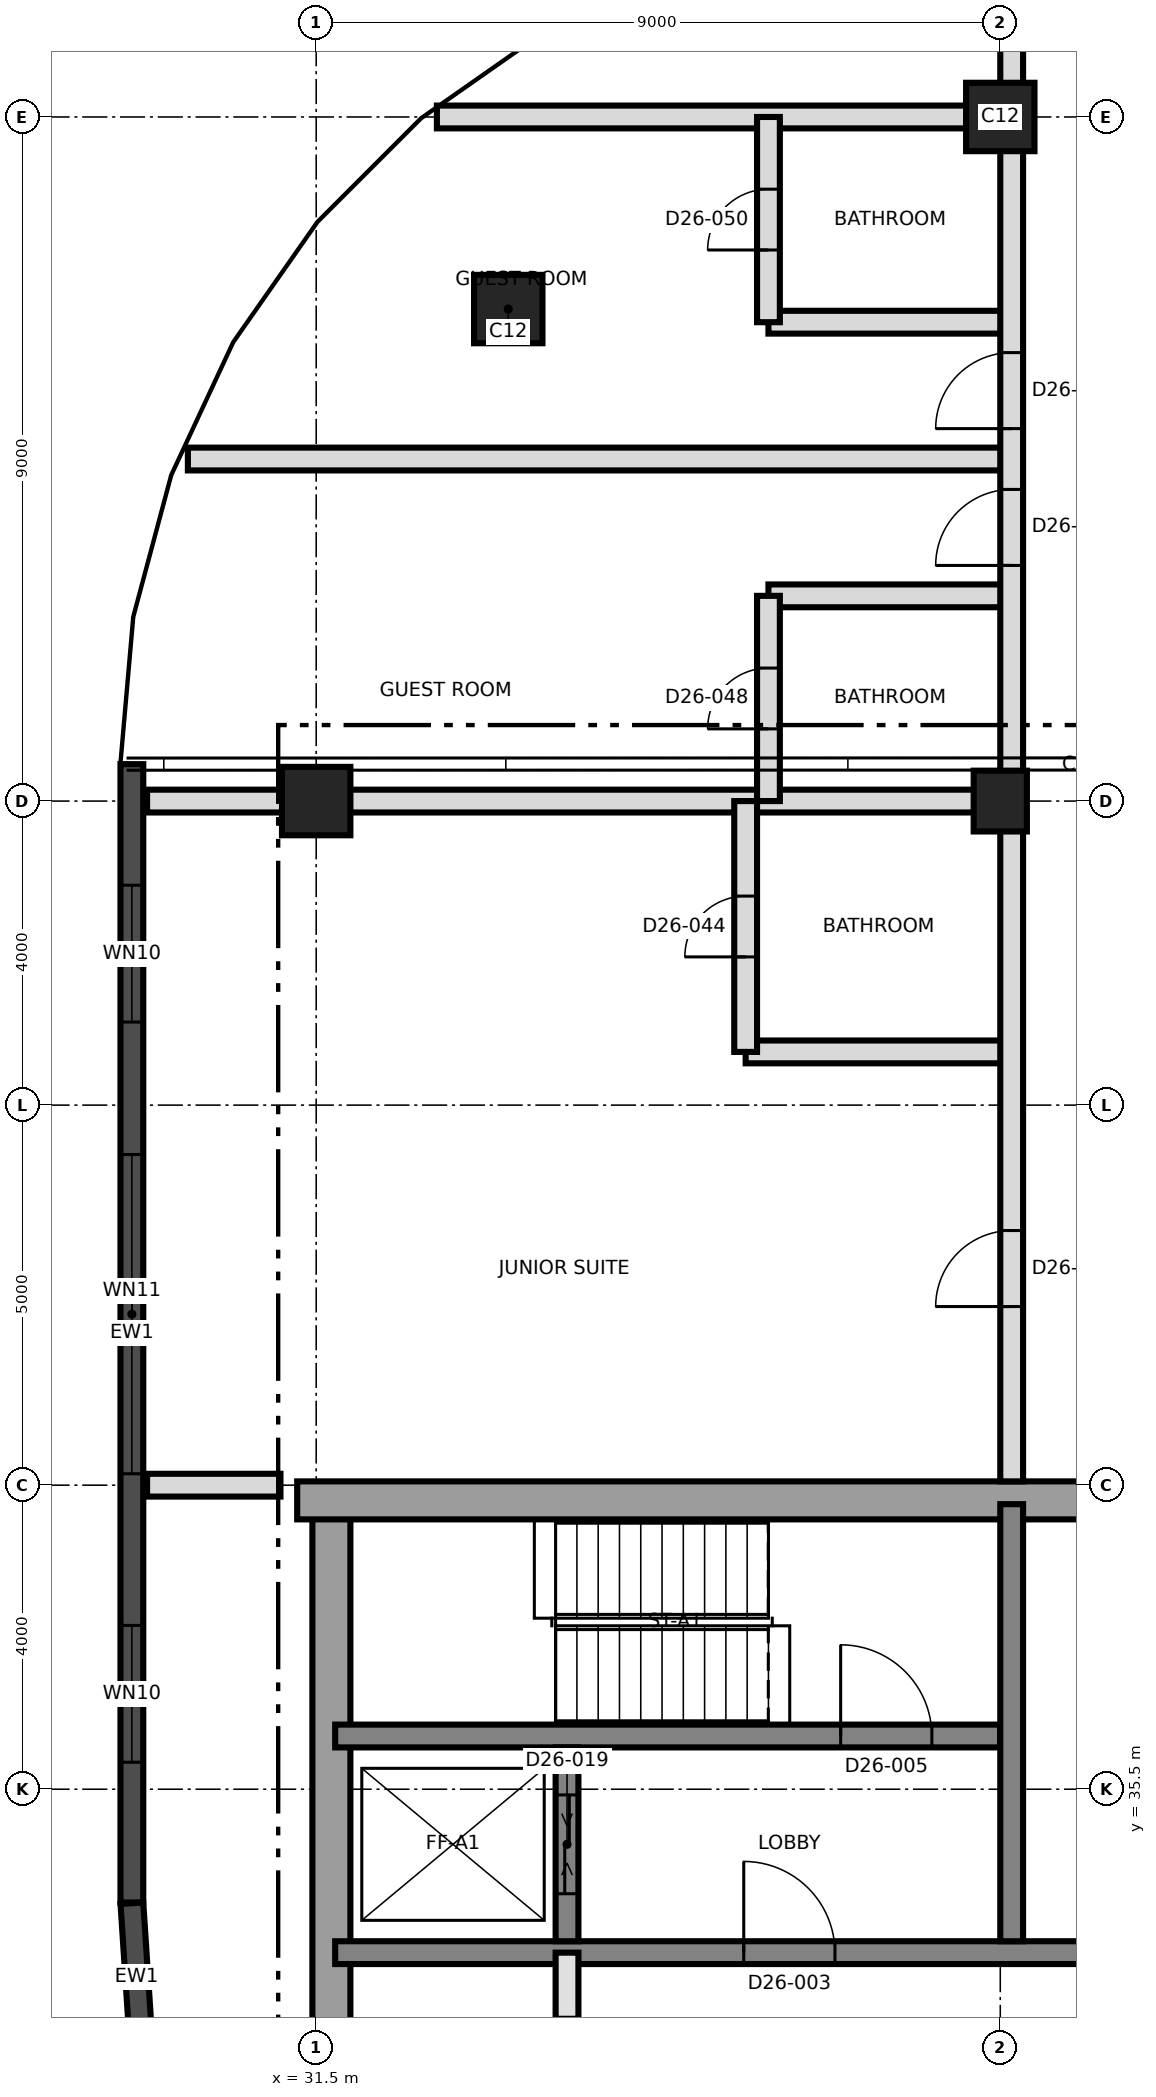
"""IFC4 building model, lengths in metres.
Left out: names, types, materials, properties, quantities, classifications, styles, units other than length and angle.
Written with IfcOpenShell. Run it as: python <this file> out.ifc"""

import sys

from ifc_helpers import new_model, si_unit, direction, frame, frame_2d, origin, origin_2d, place, context, subcontext, project, spatial, rectangle, extrude, element, fill, save


model = new_model("IFC4")
c1 = context("Model", 3, precision=1e-05, world=origin(), true_north=direction((0.0, 1.0)))
c2 = subcontext(c1, "Body", "Model", "MODEL_VIEW")
j1 = project(units=[si_unit("LENGTHUNIT", "METRE"), si_unit("PLANEANGLEUNIT", "RADIAN")], contexts=[c1])
p1 = place(None, origin())
s1 = spatial("IfcSite", under=j1, at=p1, CompositionType="ELEMENT")
p2 = place(p1, origin())
s2 = spatial("IfcBuilding", under=s1, at=p2, CompositionType="ELEMENT")
p3 = place(p2, frame((0.0, 0.0, 236.5)))
s3 = spatial("IfcBuildingStorey", under=s2, at=p3, CompositionType="ELEMENT", Elevation=236.5)
p4 = place(p3, frame((31.7, 21.75, 0.0), z_axis=(0.0, 0.0, 1.0), x_axis=(0.0, 1.0, 0.0)))
e1 = element("IfcWall", 1, at=p4, inside=s3, PredefinedType="SHEAR", context=c2, shape_type="SweptSolid", body=[
    extrude(rectangle(XDim=17.5, YDim=0.5, at=frame_2d((8.75, 0.0))), origin(), (0.0, 0.0, 1.0), 3.7),
])
p5 = place(p3, frame((31.25, 39.3, 0.0), z_axis=(0.0, 0.0, 1.0), x_axis=(1.0, 0.0, 0.0)))
e2 = element("IfcWall", 2, at=p5, inside=s3, PredefinedType="SHEAR", context=c2, shape_type="SweptSolid", body=[
    extrude(rectangle(XDim=27.0, YDim=0.5, at=frame_2d((13.5, 0.0))), origin(), (0.0, 0.0, 1.0), 3.7),
])
p6 = place(p5, frame((10.45, 0.0, 0.0)))
e3 = element("IfcOpeningElement", 3, at=p6, cuts=e2, PredefinedType="OPENING", context=c2, shape_type="SweptSolid", body=[
    extrude(rectangle(XDim=1.2, YDim=2.1, at=frame_2d((0.6, 1.05))), frame((0.0, 0.26, 0.0), z_axis=(0.0, -1.0, 0.0), x_axis=(1.0, 0.0, 0.0)), (0.0, 0.0, 1.0), 0.52),
])
p7 = place(p3, frame((31.75, 33.35, 0.0), z_axis=(0.0, 0.0, 1.0), x_axis=(1.0, 0.0, 0.0)))
e4 = element("IfcWall", 4, at=p7, inside=s3, PredefinedType="SHEAR", context=c2, shape_type="SweptSolid", body=[
    extrude(rectangle(XDim=26.5, YDim=0.3, at=frame_2d((13.25, 0.0))), origin(), (0.0, 0.0, 1.0), 3.7),
])
p8 = place(p7, frame((13.9, 0.0, 0.0)))
e5 = element("IfcOpeningElement", 5, at=p8, cuts=e4, PredefinedType="OPENING", context=c2, shape_type="SweptSolid", body=[
    extrude(rectangle(XDim=1.4, YDim=2.1, at=frame_2d((0.7, 1.05))), frame((0.0, 0.16, 0.0), z_axis=(0.0, -1.0, 0.0), x_axis=(1.0, 0.0, 0.0)), (0.0, 0.0, 1.0), 0.32),
])
p9 = place(p7, frame((5.375, 0.0, 0.0)))
e6 = element("IfcOpeningElement", 6, at=p9, cuts=e4, PredefinedType="OPENING", context=c2, shape_type="SweptSolid", body=[
    extrude(rectangle(XDim=1.2, YDim=2.1, at=frame_2d((0.6, 1.05))), frame((0.0, 0.16, 0.0), z_axis=(0.0, -1.0, 0.0), x_axis=(1.0, 0.0, 0.0)), (0.0, 0.0, 1.0), 0.32),
])
p10 = place(p7, frame((19.925, 0.0, 0.0)))
e7 = element("IfcOpeningElement", 7, at=p10, cuts=e4, PredefinedType="OPENING", context=c2, shape_type="SweptSolid", body=[
    extrude(rectangle(XDim=1.2, YDim=2.1, at=frame_2d((0.6, 1.05))), frame((0.0, 0.16, 0.0), z_axis=(0.0, -1.0, 0.0), x_axis=(1.0, 0.0, 0.0)), (0.0, 0.0, 1.0), 0.32),
])
p11 = place(p3, frame((31.75, 36.2, 0.0), z_axis=(0.0, 0.0, 1.0), x_axis=(1.0, 0.0, 0.0)))
e8 = element("IfcWall", 8, at=p11, inside=s3, PredefinedType="SHEAR", context=c2, shape_type="SweptSolid", body=[
    extrude(rectangle(XDim=8.75, YDim=0.3, at=frame_2d((4.375, 0.0))), origin(), (0.0, 0.0, 1.0), 3.7),
])
p12 = place(p11, frame((6.65, 0.0, 0.0)))
e9 = element("IfcOpeningElement", 9, at=p12, cuts=e8, PredefinedType="OPENING", context=c2, shape_type="SweptSolid", body=[
    extrude(rectangle(XDim=1.2, YDim=2.1, at=frame_2d((0.6, 1.05))), frame((0.0, 0.16, 0.0), z_axis=(0.0, -1.0, 0.0), x_axis=(1.0, 0.0, 0.0)), (0.0, 0.0, 1.0), 0.32),
])
p13 = place(p3, frame((40.65, 33.5, 0.0), z_axis=(0.0, 0.0, 1.0), x_axis=(0.0, 1.0, 0.0)))
e10 = element("IfcWall", 10, at=p13, inside=s3, PredefinedType="SHEAR", context=c2, shape_type="SweptSolid", body=[
    extrude(rectangle(XDim=5.75, YDim=0.3, at=frame_2d((2.875, 0.0))), origin(), (0.0, 0.0, 1.0), 3.7),
])
p14 = place(p3, frame((34.8, 33.5, 0.0), z_axis=(0.0, 0.0, 1.0), x_axis=(0.0, 1.0, 0.0)))
e11 = element("IfcWall", 11, at=p14, inside=s3, PredefinedType="SHEAR", context=c2, shape_type="SweptSolid", body=[
    extrude(rectangle(XDim=2.55, YDim=0.3, at=frame_2d((1.275, 0.0))), origin(), (0.0, 0.0, 1.0), 3.7),
])
p15 = place(p14, frame((0.625, 0.0, 0.0)))
e12 = element("IfcOpeningElement", 12, at=p15, cuts=e11, PredefinedType="OPENING", context=c2, shape_type="SweptSolid", body=[
    extrude(rectangle(XDim=1.3, YDim=2.4, at=frame_2d((0.65, 1.2))), frame((0.0, 0.16, 0.0), z_axis=(0.0, -1.0, 0.0), x_axis=(1.0, 0.0, 0.0)), (0.0, 0.0, 1.0), 0.32),
])
p16 = place(p3, frame((31.5, 48.5, 0.0), z_axis=(0.0, 0.0, 1.0), x_axis=(1.0, 0.0, 0.0)))
e13 = element("IfcColumn", 13, at=p16, inside=s3, PredefinedType="COLUMN", context=c2, shape_type="SweptSolid", body=[
    extrude(rectangle(XDim=0.9, YDim=0.9, at=origin_2d()), origin(), (0.0, 0.0, 1.0), 3.7),
])
p17 = place(p3, frame((40.5, 48.5, 0.0), z_axis=(0.0, 0.0, 1.0), x_axis=(0.0, 1.0, 0.0)))
e14 = element("IfcColumn", 14, at=p17, inside=s3, PredefinedType="COLUMN", context=c2, shape_type="SweptSolid", body=[
    extrude(rectangle(XDim=0.8, YDim=0.7, at=origin_2d()), origin(), (0.0, 0.0, 1.0), 3.7),
])
for number, where, z_axis, x_axis in (
    (15, (34.027, 54.973, 0.0), (0.0, 0.0, 1.0), (1.0, 0.0, 0.0)),
    (16, (40.5, 57.5, 0.0), (0.0, 0.0, 1.0), (1.0, 0.0, 0.0)),
):
    element("IfcColumn", number, at=place(p3, frame(where, z_axis=z_axis, x_axis=x_axis)), inside=s3, PredefinedType="COLUMN", context=c2, shape_type="SweptSolid", body=[
        extrude(rectangle(XDim=0.9, YDim=0.9, at=origin_2d()), origin(), (0.0, 0.0, 1.0), 3.7),
    ])
p18 = place(p3, frame((29.075, 48.986, 0.0), z_axis=(0.0, 0.0, 1.0), x_axis=(0.0, -1.0, 0.0)))
e17 = element("IfcWall", 17, at=p18, inside=s3, PredefinedType="SOLIDWALL", context=c2, shape_type="SweptSolid", body=[
    extrude(rectangle(XDim=14.976, YDim=0.3, at=frame_2d((7.488, 0.0))), origin(), (0.0, 0.0, 1.0), 3.4),
])
p19 = place(p18, frame((1.593, 0.0, 0.3)))
e18 = element("IfcOpeningElement", 18, at=p19, cuts=e17, PredefinedType="OPENING", context=c2, shape_type="SweptSolid", body=[
    extrude(rectangle(XDim=1.8, YDim=2.4, at=frame_2d((0.9, 1.2))), frame((0.0, 0.16, 0.0), z_axis=(0.0, -1.0, 0.0), x_axis=(1.0, 0.0, 0.0)), (0.0, 0.0, 1.0), 0.32),
])
p20 = place(p18, frame((5.136, 0.0, 0.9)))
e19 = element("IfcOpeningElement", 19, at=p20, cuts=e17, PredefinedType="OPENING", context=c2, shape_type="SweptSolid", body=[
    extrude(rectangle(XDim=4.2, YDim=1.5, at=frame_2d((2.1, 0.75))), frame((0.0, 0.16, 0.0), z_axis=(0.0, -1.0, 0.0), x_axis=(1.0, 0.0, 0.0)), (0.0, 0.0, 1.0), 0.32),
])
p21 = place(p18, frame((11.331, 0.0, 0.3)))
e20 = element("IfcOpeningElement", 20, at=p21, cuts=e17, PredefinedType="OPENING", context=c2, shape_type="SweptSolid", body=[
    extrude(rectangle(XDim=1.8, YDim=2.4, at=frame_2d((0.9, 1.2))), frame((0.0, 0.16, 0.0), z_axis=(0.0, -1.0, 0.0), x_axis=(1.0, 0.0, 0.0)), (0.0, 0.0, 1.0), 0.32),
])
p22 = place(p3, frame((29.075, 34.0, 0.0), z_axis=(0.0, 0.0, 1.0), x_axis=(0.065359381612, -0.997861789646, 0.0)))
e21 = element("IfcWall", 21, at=p22, inside=s3, PredefinedType="SOLIDWALL", context=c2, shape_type="SweptSolid", body=[
    extrude(rectangle(XDim=1.942, YDim=0.3, at=frame_2d((0.971, 0.0))), origin(), (0.0, 0.0, 1.0), 3.4),
])
p23 = place(p3, frame((34.8, 30.65, 0.0), z_axis=(0.0, 0.0, 1.0), x_axis=(0.0, 1.0, 0.0)))
e22 = element("IfcWall", 22, at=p23, inside=s3, PredefinedType="SOLIDWALL", context=c2, shape_type="SweptSolid", body=[
    extrude(rectangle(XDim=2.7, YDim=0.3, at=frame_2d((1.35, 0.0))), origin(), (0.0, 0.0, 1.0), 3.4),
])
p24 = place(p23, frame((0.85, 0.0, 0.0)))
e23 = element("IfcOpeningElement", 23, at=p24, cuts=e22, PredefinedType="OPENING", context=c2, shape_type="SweptSolid", body=[
    extrude(rectangle(XDim=1.0, YDim=2.1, at=frame_2d((0.5, 1.05))), frame((0.0, 0.16, 0.0), z_axis=(0.0, -1.0, 0.0), x_axis=(1.0, 0.0, 0.0)), (0.0, 0.0, 1.0), 0.32),
])
p25 = place(p3, frame((29.275, 39.5, 0.0), z_axis=(0.0, 0.0, 1.0), x_axis=(1.0, 0.0, 0.0)))
e24 = element("IfcWall", 24, at=p25, inside=s3, PredefinedType="PARTITIONING", context=c2, shape_type="SweptSolid", body=[
    extrude(rectangle(XDim=1.755, YDim=0.3, at=frame_2d((0.877, 0.0))), origin(), (0.0, 0.0, 1.0), 3.4),
])
p26 = place(p3, frame((37.15, 45.2, 0.0), z_axis=(0.0, 0.0, 1.0), x_axis=(1.0, 0.0, 0.0)))
e25 = element("IfcWall", 25, at=p26, inside=s3, PredefinedType="PARTITIONING", context=c2, shape_type="SweptSolid", body=[
    extrude(rectangle(XDim=3.5, YDim=0.3, at=frame_2d((1.75, 0.0))), origin(), (0.0, 0.0, 1.0), 3.4),
])
p27 = place(p3, frame((29.275, 48.5, 0.0), z_axis=(0.0, 0.0, 1.0), x_axis=(1.0, 0.0, 0.0)))
e26 = element("IfcWall", 26, at=p27, inside=s3, PredefinedType="PARTITIONING", context=c2, shape_type="SweptSolid", body=[
    extrude(rectangle(XDim=11.375, YDim=0.3, at=frame_2d((5.688, 0.0))), origin(), (0.0, 0.0, 1.0), 3.4),
])
p28 = place(p3, frame((37.45, 51.2, 0.0), z_axis=(0.0, 0.0, 1.0), x_axis=(1.0, 0.0, 0.0)))
e27 = element("IfcWall", 27, at=p28, inside=s3, PredefinedType="PARTITIONING", context=c2, shape_type="SweptSolid", body=[
    extrude(rectangle(XDim=3.2, YDim=0.3, at=frame_2d((1.6, 0.0))), origin(), (0.0, 0.0, 1.0), 3.4),
])
p29 = place(p3, frame((29.812, 53.0, 0.0), z_axis=(0.0, 0.0, 1.0), x_axis=(1.0, 0.0, 0.0)))
e28 = element("IfcWall", 28, at=p29, inside=s3, PredefinedType="PARTITIONING", context=c2, shape_type="SweptSolid", body=[
    extrude(rectangle(XDim=10.838, YDim=0.3, at=frame_2d((5.419, 0.0))), origin(), (0.0, 0.0, 1.0), 3.4),
])
p30 = place(p3, frame((37.45, 54.8, 0.0), z_axis=(0.0, 0.0, 1.0), x_axis=(1.0, 0.0, 0.0)))
e29 = element("IfcWall", 29, at=p30, inside=s3, PredefinedType="PARTITIONING", context=c2, shape_type="SweptSolid", body=[
    extrude(rectangle(XDim=3.2, YDim=0.3, at=frame_2d((1.6, 0.0))), origin(), (0.0, 0.0, 1.0), 3.4),
])
p31 = place(p3, frame((33.088, 57.5, 0.0), z_axis=(0.0, 0.0, 1.0), x_axis=(1.0, 0.0, 0.0)))
e30 = element("IfcWall", 30, at=p31, inside=s3, PredefinedType="PARTITIONING", context=c2, shape_type="SweptSolid", body=[
    extrude(rectangle(XDim=7.562, YDim=0.3, at=frame_2d((3.781, 0.0))), origin(), (0.0, 0.0, 1.0), 3.4),
])
p32 = place(p3, frame((37.15, 45.2, 0.0), z_axis=(0.0, 0.0, 1.0), x_axis=(0.0, 1.0, 0.0)))
e31 = element("IfcWall", 31, at=p32, inside=s3, PredefinedType="PARTITIONING", context=c2, shape_type="SweptSolid", body=[
    extrude(rectangle(XDim=3.3, YDim=0.3, at=frame_2d((1.65, 0.0))), origin(), (0.0, 0.0, 1.0), 3.4),
])
p33 = place(p32, frame((1.25, 0.0, 0.0)))
e32 = element("IfcOpeningElement", 32, at=p33, cuts=e31, PredefinedType="OPENING", context=c2, shape_type="SweptSolid", body=[
    extrude(rectangle(XDim=0.8, YDim=2.1, at=frame_2d((0.4, 1.05))), frame((0.0, 0.16, 0.0), z_axis=(0.0, -1.0, 0.0), x_axis=(1.0, 0.0, 0.0)), (0.0, 0.0, 1.0), 0.32),
])
p34 = place(p3, frame((37.45, 48.5, 0.0), z_axis=(0.0, 0.0, 1.0), x_axis=(0.0, 1.0, 0.0)))
e33 = element("IfcWall", 33, at=p34, inside=s3, PredefinedType="PARTITIONING", context=c2, shape_type="SweptSolid", body=[
    extrude(rectangle(XDim=2.7, YDim=0.3, at=frame_2d((1.35, 0.0))), origin(), (0.0, 0.0, 1.0), 3.4),
])
p35 = place(p34, frame((0.95, 0.0, 0.0)))
e34 = element("IfcOpeningElement", 34, at=p35, cuts=e33, PredefinedType="OPENING", context=c2, shape_type="SweptSolid", body=[
    extrude(rectangle(XDim=0.8, YDim=2.1, at=frame_2d((0.4, 1.05))), frame((0.0, 0.16, 0.0), z_axis=(0.0, -1.0, 0.0), x_axis=(1.0, 0.0, 0.0)), (0.0, 0.0, 1.0), 0.32),
])
p36 = place(p3, frame((37.45, 54.8, 0.0), z_axis=(0.0, 0.0, 1.0), x_axis=(0.0, 1.0, 0.0)))
e35 = element("IfcWall", 35, at=p36, inside=s3, PredefinedType="PARTITIONING", context=c2, shape_type="SweptSolid", body=[
    extrude(rectangle(XDim=2.7, YDim=0.3, at=frame_2d((1.35, 0.0))), origin(), (0.0, 0.0, 1.0), 3.4),
])
p37 = place(p36, frame((0.95, 0.0, 0.0)))
e36 = element("IfcOpeningElement", 36, at=p37, cuts=e35, PredefinedType="OPENING", context=c2, shape_type="SweptSolid", body=[
    extrude(rectangle(XDim=0.8, YDim=2.1, at=frame_2d((0.4, 1.05))), frame((0.0, 0.16, 0.0), z_axis=(0.0, -1.0, 0.0), x_axis=(1.0, 0.0, 0.0)), (0.0, 0.0, 1.0), 0.32),
])
p38 = place(p3, frame((40.65, 39.55, 0.0), z_axis=(0.0, 0.0, 1.0), x_axis=(0.0, 1.0, 0.0)))
e37 = element("IfcWall", 37, at=p38, inside=s3, PredefinedType="PARTITIONING", context=c2, shape_type="SweptSolid", body=[
    extrude(rectangle(XDim=19.0, YDim=0.3, at=frame_2d((9.5, 0.0))), origin(), (0.0, 0.0, 1.0), 3.4),
])
p39 = place(p38, frame((2.3, 0.0, 0.0)))
e38 = element("IfcOpeningElement", 38, at=p39, cuts=e37, PredefinedType="OPENING", context=c2, shape_type="SweptSolid", body=[
    extrude(rectangle(XDim=1.0, YDim=2.4, at=frame_2d((0.5, 1.2))), frame((0.0, 0.16, 0.0), z_axis=(0.0, -1.0, 0.0), x_axis=(1.0, 0.0, 0.0)), (0.0, 0.0, 1.0), 0.32),
])
p40 = place(p38, frame((12.05, 0.0, 0.0)))
e39 = element("IfcOpeningElement", 39, at=p40, cuts=e37, PredefinedType="OPENING", context=c2, shape_type="SweptSolid", body=[
    extrude(rectangle(XDim=1.0, YDim=2.1, at=frame_2d((0.5, 1.05))), frame((0.0, 0.16, 0.0), z_axis=(0.0, -1.0, 0.0), x_axis=(1.0, 0.0, 0.0)), (0.0, 0.0, 1.0), 0.32),
])
p41 = place(p38, frame((13.85, 0.0, 0.0)))
e40 = element("IfcOpeningElement", 40, at=p41, cuts=e37, PredefinedType="OPENING", context=c2, shape_type="SweptSolid", body=[
    extrude(rectangle(XDim=1.0, YDim=2.1, at=frame_2d((0.5, 1.05))), frame((0.0, 0.16, 0.0), z_axis=(0.0, -1.0, 0.0), x_axis=(1.0, 0.0, 0.0)), (0.0, 0.0, 1.0), 0.32),
])
p42 = place(p19, origin())
e41 = element("IfcWindow", 41, at=p42, inside=s3, PartitioningType="SINGLE_PANEL", PredefinedType="WINDOW", context=c2, shape_type="SweptSolid", body=[
    extrude(rectangle(XDim=1.8, YDim=2.4, at=frame_2d((0.9, 1.2))), frame((0.0, 0.03, 0.0), z_axis=(0.0, -1.0, 0.0), x_axis=(1.0, 0.0, 0.0)), (0.0, 0.0, 1.0), 0.06),
])
fill(e18, e41)
p43 = place(p20, origin())
e42 = element("IfcWindow", 42, at=p43, inside=s3, PartitioningType="SINGLE_PANEL", PredefinedType="WINDOW", context=c2, shape_type="SweptSolid", body=[
    extrude(rectangle(XDim=4.2, YDim=1.5, at=frame_2d((2.1, 0.75))), frame((0.0, 0.03, 0.0), z_axis=(0.0, -1.0, 0.0), x_axis=(1.0, 0.0, 0.0)), (0.0, 0.0, 1.0), 0.06),
])
fill(e19, e42)
p44 = place(p21, origin())
e43 = element("IfcWindow", 43, at=p44, inside=s3, PartitioningType="SINGLE_PANEL", PredefinedType="WINDOW", context=c2, shape_type="SweptSolid", body=[
    extrude(rectangle(XDim=1.8, YDim=2.4, at=frame_2d((0.9, 1.2))), frame((0.0, 0.03, 0.0), z_axis=(0.0, -1.0, 0.0), x_axis=(1.0, 0.0, 0.0)), (0.0, 0.0, 1.0), 0.06),
])
fill(e20, e43)
p45 = place(p9, origin())
e44 = element("IfcDoor", 44, at=p45, inside=s3, OperationType="SINGLE_SWING_LEFT", PredefinedType="DOOR", context=c2, shape_type="SweptSolid", body=[
    extrude(rectangle(XDim=1.2, YDim=2.1, at=frame_2d((0.6, 1.05))), frame((0.0, 0.025, 0.0), z_axis=(0.0, -1.0, 0.0), x_axis=(1.0, 0.0, 0.0)), (0.0, 0.0, 1.0), 0.05),
])
fill(e6, e44)
p46 = place(p12, origin())
e45 = element("IfcDoor", 45, at=p46, inside=s3, OperationType="SINGLE_SWING_RIGHT", PredefinedType="DOOR", context=c2, shape_type="SweptSolid", body=[
    extrude(rectangle(XDim=1.2, YDim=2.1, at=frame_2d((0.6, 1.05))), frame((0.0, 0.025, 0.0), z_axis=(0.0, -1.0, 0.0), x_axis=(1.0, 0.0, 0.0)), (0.0, 0.0, 1.0), 0.05),
])
fill(e9, e45)
p47 = place(p15, origin())
e46 = element("IfcDoor", 46, at=p47, inside=s3, OperationType="SLIDING_TO_LEFT", PredefinedType="DOOR", context=c2, shape_type="SweptSolid", body=[
    extrude(rectangle(XDim=1.3, YDim=2.4, at=frame_2d((0.65, 1.2))), frame((0.0, 0.025, 0.0), z_axis=(0.0, -1.0, 0.0), x_axis=(1.0, 0.0, 0.0)), (0.0, 0.0, 1.0), 0.05),
])
fill(e12, e46)
p48 = place(p33, origin())
e47 = element("IfcDoor", 47, at=p48, inside=s3, OperationType="SINGLE_SWING_LEFT", PredefinedType="DOOR", context=c2, shape_type="SweptSolid", body=[
    extrude(rectangle(XDim=0.8, YDim=2.1, at=frame_2d((0.4, 1.05))), frame((0.0, 0.025, 0.0), z_axis=(0.0, -1.0, 0.0), x_axis=(1.0, 0.0, 0.0)), (0.0, 0.0, 1.0), 0.05),
])
fill(e32, e47)
p49 = place(p39, origin())
e48 = element("IfcDoor", 48, at=p49, inside=s3, OperationType="SINGLE_SWING_LEFT", PredefinedType="DOOR", context=c2, shape_type="SweptSolid", body=[
    extrude(rectangle(XDim=1.0, YDim=2.4, at=frame_2d((0.5, 1.2))), frame((0.0, 0.025, 0.0), z_axis=(0.0, -1.0, 0.0), x_axis=(1.0, 0.0, 0.0)), (0.0, 0.0, 1.0), 0.05),
])
fill(e38, e48)
p50 = place(p35, origin())
e49 = element("IfcDoor", 49, at=p50, inside=s3, OperationType="SINGLE_SWING_RIGHT", PredefinedType="DOOR", context=c2, shape_type="SweptSolid", body=[
    extrude(rectangle(XDim=0.8, YDim=2.1, at=frame_2d((0.4, 1.05))), frame((0.0, 0.025, 0.0), z_axis=(0.0, -1.0, 0.0), x_axis=(1.0, 0.0, 0.0)), (0.0, 0.0, 1.0), 0.05),
])
fill(e34, e49)
p51 = place(p40, origin())
e50 = element("IfcDoor", 50, at=p51, inside=s3, OperationType="SINGLE_SWING_LEFT", PredefinedType="DOOR", context=c2, shape_type="SweptSolid", body=[
    extrude(rectangle(XDim=1.0, YDim=2.1, at=frame_2d((0.5, 1.05))), frame((0.0, 0.025, 0.0), z_axis=(0.0, -1.0, 0.0), x_axis=(1.0, 0.0, 0.0)), (0.0, 0.0, 1.0), 0.05),
])
fill(e39, e50)
p52 = place(p37, origin())
e51 = element("IfcDoor", 51, at=p52, inside=s3, OperationType="SINGLE_SWING_LEFT", PredefinedType="DOOR", context=c2, shape_type="SweptSolid", body=[
    extrude(rectangle(XDim=0.8, YDim=2.1, at=frame_2d((0.4, 1.05))), frame((0.0, 0.025, 0.0), z_axis=(0.0, -1.0, 0.0), x_axis=(1.0, 0.0, 0.0)), (0.0, 0.0, 1.0), 0.05),
])
fill(e36, e51)
p53 = place(p41, origin())
e52 = element("IfcDoor", 52, at=p53, inside=s3, OperationType="SINGLE_SWING_LEFT", PredefinedType="DOOR", context=c2, shape_type="SweptSolid", body=[
    extrude(rectangle(XDim=1.0, YDim=2.1, at=frame_2d((0.5, 1.05))), frame((0.0, 0.025, 0.0), z_axis=(0.0, -1.0, 0.0), x_axis=(1.0, 0.0, 0.0)), (0.0, 0.0, 1.0), 0.05),
])
fill(e40, e52)
save(model, sys.argv[1])
